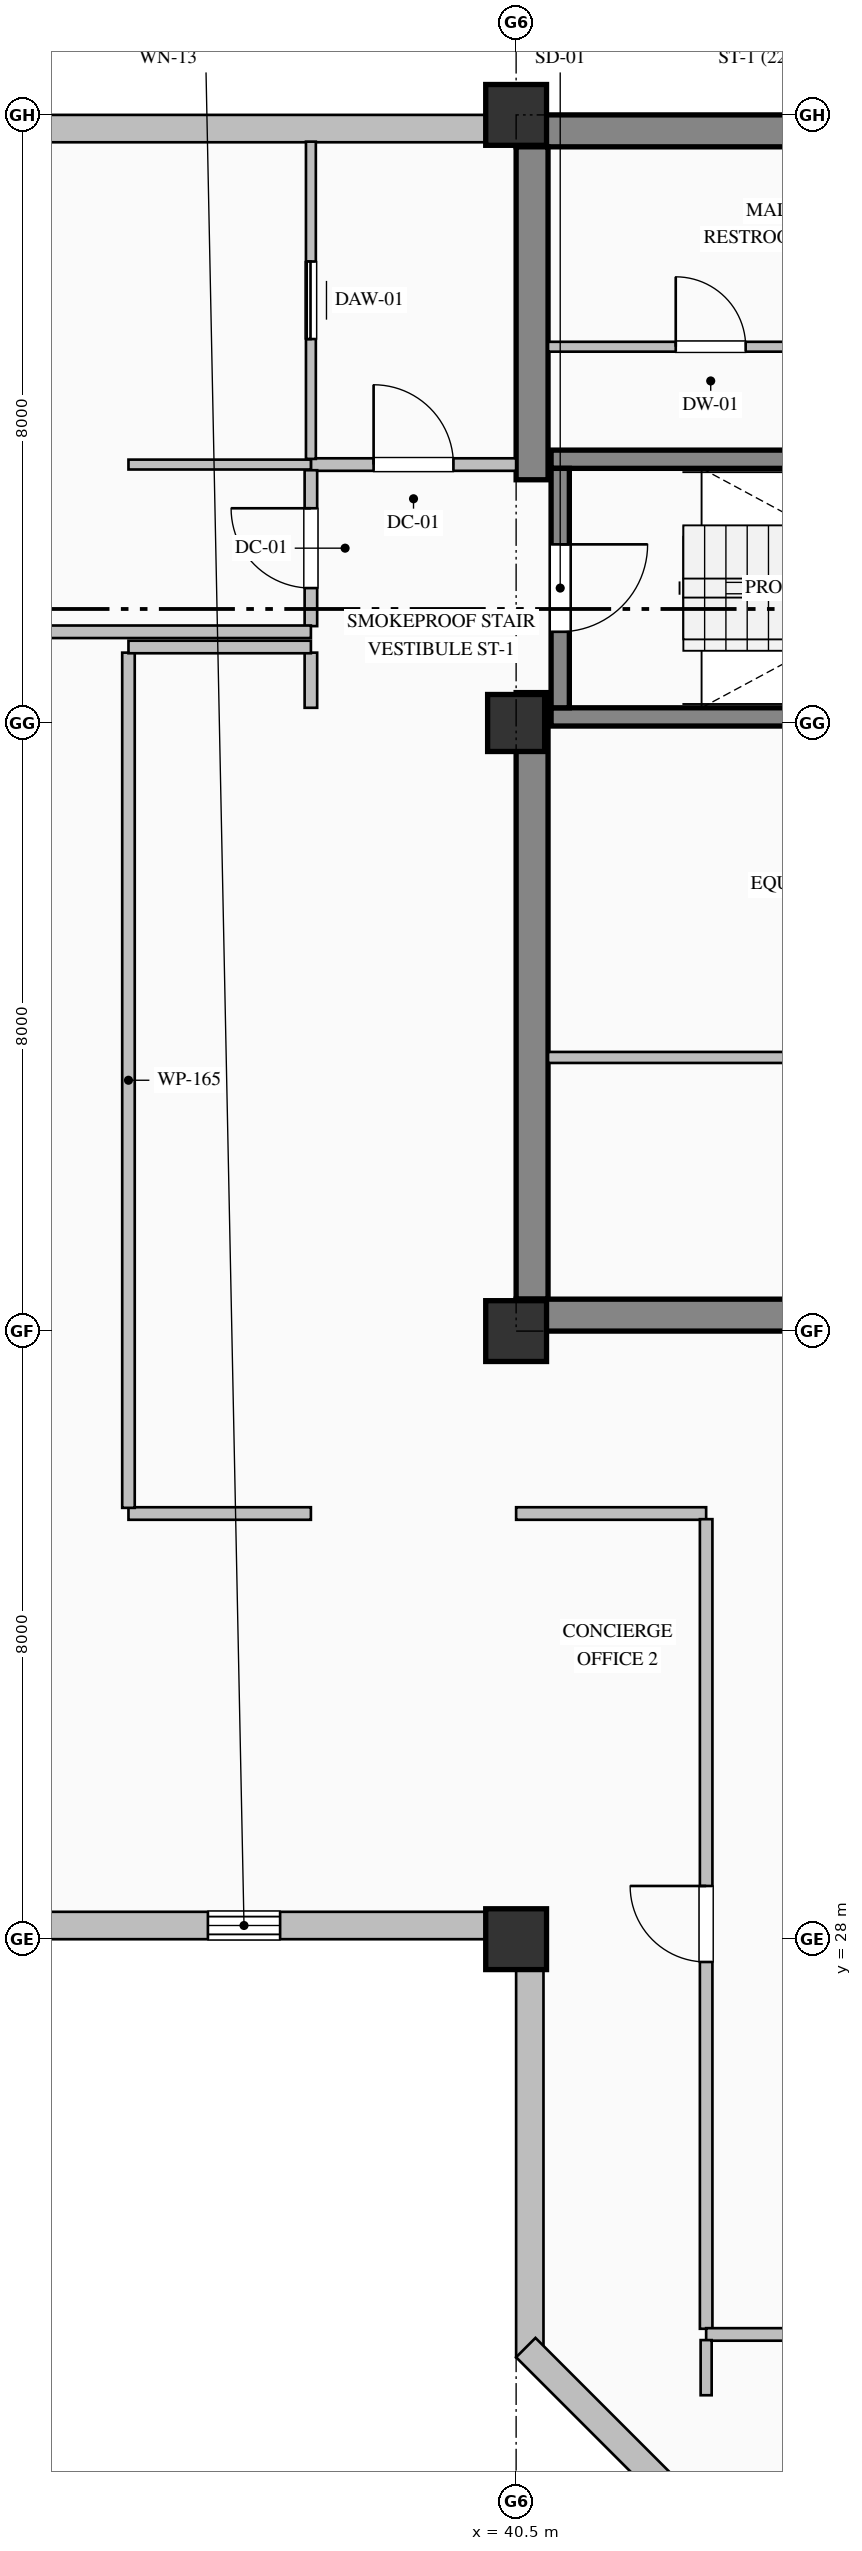
"""IFC4 building model, lengths in metres.
Left out: names, types, materials, properties, quantities, classifications, styles, units other than length and angle.
Written with IfcOpenShell. Run it as: python <this file> out.ifc"""

import sys

from ifc_helpers import new_model, si_unit, direction, frame, frame_2d, origin, origin_2d, place, context, subcontext, project, spatial, rectangle, hollow_rectangle, extrude, element, fill, save


model = new_model("IFC4")
c1 = context("Model", 3, precision=1e-05, world=origin(), true_north=direction((0.0, 1.0)))
c2 = subcontext(c1, "Body", "Model", "MODEL_VIEW")
j1 = project(units=[si_unit("LENGTHUNIT", "METRE"), si_unit("PLANEANGLEUNIT", "RADIAN")], contexts=[c1])
p1 = place(None, origin())
s1 = spatial("IfcSite", under=j1, at=p1, CompositionType="ELEMENT")
p2 = place(p1, origin())
s2 = spatial("IfcBuilding", under=s1, at=p2, CompositionType="ELEMENT")
p3 = place(p2, frame((0.0, 0.0, 331.2)))
s3 = spatial("IfcBuildingStorey", under=s2, at=p3, CompositionType="ELEMENT", Elevation=331.2)
p4 = place(p3, frame((40.5, 51.79, 0.0), z_axis=(0.0, 0.0, 1.0), x_axis=(1.0, 0.0, 0.0)))
e1 = element("IfcWall", 1, at=p4, inside=s3, PredefinedType="SHEAR", context=c2, shape_type="SweptSolid", body=[
    extrude(rectangle(XDim=23.5, YDim=0.42, at=frame_2d((11.75, 0.0))), origin(), (0.0, 0.0, 1.0), 3.785),
])
p5 = place(p3, frame((40.71, 36.42, 0.0), z_axis=(0.0, 0.0, 1.0), x_axis=(0.0, 1.0, 0.0)))
e2 = element("IfcWall", 2, at=p5, inside=s3, PredefinedType="SHEAR", context=c2, shape_type="SweptSolid", body=[
    extrude(rectangle(XDim=7.98, YDim=0.42, at=frame_2d((3.99, 0.0))), origin(), (0.0, 0.0, 1.0), 3.785),
])
p6 = place(p3, frame((40.71, 47.2, 0.0), z_axis=(0.0, 0.0, 1.0), x_axis=(0.0, 1.0, 0.0)))
e3 = element("IfcWall", 3, at=p6, inside=s3, PredefinedType="SHEAR", context=c2, shape_type="SweptSolid", body=[
    extrude(rectangle(XDim=4.38, YDim=0.42, at=frame_2d((2.19, 0.0))), origin(), (0.0, 0.0, 1.0), 3.785),
])
p7 = place(p3, frame((40.5, 36.21, 0.0), z_axis=(0.0, 0.0, 1.0), x_axis=(1.0, 0.0, 0.0)))
e4 = element("IfcWall", 4, at=p7, inside=s3, PredefinedType="SHEAR", context=c2, shape_type="SweptSolid", body=[
    extrude(rectangle(XDim=9.1, YDim=0.42, at=frame_2d((4.55, 0.0))), origin(), (0.0, 0.0, 1.0), 3.785),
])
for number, where, z_axis, x_axis in (
    (5, (40.5, 28.0, 0.0), (0.0, 0.0, 1.0), (1.0, 0.0, 0.0)),
    (6, (40.5, 36.0, 0.0), (0.0, 0.0, 1.0), (1.0, 0.0, 0.0)),
):
    element("IfcColumn", number, at=place(p3, frame(where, z_axis=z_axis, x_axis=x_axis)), inside=s3, PredefinedType="COLUMN", context=c2, shape_type="SweptSolid", body=[
        extrude(hollow_rectangle(XDim=0.8, YDim=0.8, WallThickness=0.032, at=origin_2d()), origin(), (0.0, 0.0, 1.0), 4.0),
    ])
p8 = place(p3, frame((40.5, 44.0, 0.0), z_axis=(0.0, 0.0, 1.0), x_axis=(1.0, 0.0, 0.0)))
e7 = element("IfcColumn", 7, at=p8, inside=s3, PredefinedType="COLUMN", context=c2, shape_type="SweptSolid", body=[
    extrude(rectangle(XDim=0.75, YDim=0.75, at=origin_2d()), origin(), (0.0, 0.0, 1.0), 4.0),
])
p9 = place(p3, frame((40.5, 52.0, 0.0), z_axis=(0.0, 0.0, 1.0), x_axis=(1.0, 0.0, 0.0)))
e8 = element("IfcColumn", 8, at=p9, inside=s3, PredefinedType="COLUMN", context=c2, shape_type="SweptSolid", body=[
    extrude(hollow_rectangle(XDim=0.8, YDim=0.8, WallThickness=0.032, at=origin_2d()), origin(), (0.0, 0.0, 1.0), 4.0),
])
p10 = place(p3, frame((40.68, 22.5, 0.0), z_axis=(0.0, 0.0, 1.0), x_axis=(0.0, 1.0, 0.0)))
e9 = element("IfcWall", 9, at=p10, inside=s3, PredefinedType="SOLIDWALL", context=c2, shape_type="SweptSolid", body=[
    extrude(rectangle(XDim=5.86, YDim=0.36, at=frame_2d((2.93, 0.0))), origin(), (0.0, 0.0, 1.0), 3.185),
])
p11 = place(p3, frame((40.52, 28.18, 0.0), z_axis=(0.0, 0.0, 1.0), x_axis=(-1.0, 0.0, 0.0)))
e10 = element("IfcWall", 10, at=p11, inside=s3, PredefinedType="SOLIDWALL", context=c2, shape_type="SweptSolid", body=[
    extrude(rectangle(XDim=20.02, YDim=0.36, at=frame_2d((10.01, 0.0))), origin(), (0.0, 0.0, 1.0), 3.185),
])
p12 = place(p11, frame((3.125, 0.0, 0.9)))
e11 = element("IfcOpeningElement", 11, at=p12, cuts=e10, PredefinedType="OPENING", context=c2, shape_type="SweptSolid", body=[
    extrude(rectangle(XDim=0.95, YDim=1.85, at=frame_2d((0.475, 0.925))), frame((0.0, 0.19, 0.0), z_axis=(0.0, -1.0, 0.0), x_axis=(1.0, 0.0, 0.0)), (0.0, 0.0, 1.0), 0.38),
])
p13 = place(p11, frame((10.125, 0.0, 0.9)))
e12 = element("IfcOpeningElement", 12, at=p13, cuts=e10, PredefinedType="OPENING", context=c2, shape_type="SweptSolid", body=[
    extrude(rectangle(XDim=1.35, YDim=1.85, at=frame_2d((0.675, 0.925))), frame((0.0, 0.19, 0.0), z_axis=(0.0, -1.0, 0.0), x_axis=(1.0, 0.0, 0.0)), (0.0, 0.0, 1.0), 0.38),
])
p14 = place(p11, frame((13.925, 0.0, 0.9)))
e13 = element("IfcOpeningElement", 13, at=p14, cuts=e10, PredefinedType="OPENING", context=c2, shape_type="SweptSolid", body=[
    extrude(rectangle(XDim=0.95, YDim=1.85, at=frame_2d((0.475, 0.925))), frame((0.0, 0.19, 0.0), z_axis=(0.0, -1.0, 0.0), x_axis=(1.0, 0.0, 0.0)), (0.0, 0.0, 1.0), 0.38),
])
p15 = place(p3, frame((20.5, 51.82, 0.0), z_axis=(0.0, 0.0, 1.0), x_axis=(1.0, 0.0, 0.0)))
e14 = element("IfcWall", 14, at=p15, inside=s3, PredefinedType="SOLIDWALL", context=c2, shape_type="SweptSolid", body=[
    extrude(rectangle(XDim=20.02, YDim=0.36, at=frame_2d((10.01, 0.0))), origin(), (0.0, 0.0, 1.0), 3.335),
])
p16 = place(p15, frame((6.525, 0.0, 0.9)))
e15 = element("IfcOpeningElement", 15, at=p16, cuts=e14, PredefinedType="OPENING", context=c2, shape_type="SweptSolid", body=[
    extrude(rectangle(XDim=1.35, YDim=1.85, at=frame_2d((0.675, 0.925))), frame((0.0, 0.19, 0.0), z_axis=(0.0, -1.0, 0.0), x_axis=(1.0, 0.0, 0.0)), (0.0, 0.0, 1.0), 0.38),
])
p17 = place(p15, frame((10.325, 0.0, 0.9)))
e16 = element("IfcOpeningElement", 16, at=p17, cuts=e14, PredefinedType="OPENING", context=c2, shape_type="SweptSolid", body=[
    extrude(rectangle(XDim=0.95, YDim=1.85, at=frame_2d((0.475, 0.925))), frame((0.0, 0.19, 0.0), z_axis=(0.0, -1.0, 0.0), x_axis=(1.0, 0.0, 0.0)), (0.0, 0.0, 1.0), 0.38),
])
p18 = place(p3, frame((44.627, 18.627, 0.0), z_axis=(0.0, 0.0, 1.0), x_axis=(-0.707106781187, 0.707106781187, 0.0)))
e17 = element("IfcWall", 17, at=p18, inside=s3, PredefinedType="SOLIDWALL", context=c2, shape_type="SweptSolid", body=[
    extrude(rectangle(XDim=5.657, YDim=0.36, at=frame_2d((2.828, 0.0))), origin(), (0.0, 0.0, 1.0), 3.785),
])
for number, where, z_axis, x_axis in (
    (18, (40.96, 47.47, 0.0), (0.0, 0.0, 1.0), (1.0, 0.0, 0.0)),
    (19, (49.04, 44.08, 0.0), (0.0, 0.0, 1.0), (-1.0, 0.0, 0.0)),
):
    element("IfcWall", number, at=place(p3, frame(where, z_axis=z_axis, x_axis=x_axis)), inside=s3, PredefinedType="SOLIDWALL", context=c2, shape_type="SweptSolid", body=[
        extrude(rectangle(XDim=8.08, YDim=0.24, at=frame_2d((4.04, 0.0))), origin(), (0.0, 0.0, 1.0), 4.0),
    ])
p19 = place(p3, frame((41.08, 47.35, 0.0), z_axis=(0.0, 0.0, 1.0), x_axis=(0.0, -1.0, 0.0)))
e20 = element("IfcWall", 20, at=p19, inside=s3, PredefinedType="SOLIDWALL", context=c2, shape_type="SweptSolid", body=[
    extrude(rectangle(XDim=3.15, YDim=0.24, at=frame_2d((1.575, 0.0))), origin(), (0.0, 0.0, 1.0), 4.0),
])
p20 = place(p19, frame((1.0, 0.0, 0.0)))
e21 = element("IfcOpeningElement", 21, at=p20, cuts=e20, PredefinedType="OPENING", context=c2, shape_type="SweptSolid", body=[
    extrude(rectangle(XDim=1.15, YDim=2.2, at=frame_2d((0.575, 1.1))), frame((0.0, 0.13, 0.0), z_axis=(0.0, -1.0, 0.0), x_axis=(1.0, 0.0, 0.0)), (0.0, 0.0, 1.0), 0.26),
])
p21 = place(p3, frame((37.8, 47.4, 0.0), z_axis=(0.0, 0.0, 1.0), x_axis=(1.0, 0.0, 0.0)))
e22 = element("IfcWall", 22, at=p21, inside=s3, PredefinedType="PARTITIONING", context=c2, shape_type="SweptSolid", body=[
    extrude(rectangle(XDim=2.7, YDim=0.165, at=frame_2d((1.35, 0.0))), origin(), (0.0, 0.0, 1.0), 3.785),
])
p22 = place(p21, frame((0.825, 0.0, 0.0)))
e23 = element("IfcOpeningElement", 23, at=p22, cuts=e22, PredefinedType="OPENING", context=c2, shape_type="SweptSolid", body=[
    extrude(rectangle(XDim=1.05, YDim=2.15, at=frame_2d((0.525, 1.075))), frame((0.0, 0.093, 0.0), z_axis=(0.0, -1.0, 0.0), x_axis=(1.0, 0.0, 0.0)), (0.0, 0.0, 1.0), 0.185),
])
p23 = place(p3, frame((37.8, 45.274, 0.0), z_axis=(0.0, 0.0, 1.0), x_axis=(0.0, 1.0, 0.0)))
e24 = element("IfcWall", 24, at=p23, inside=s3, PredefinedType="PARTITIONING", context=c2, shape_type="SweptSolid", body=[
    extrude(rectangle(XDim=2.051, YDim=0.165, at=frame_2d((1.025, 0.0))), origin(), (0.0, 0.0, 1.0), 3.785),
])
p24 = place(p23, frame((0.5, 0.0, 0.0)))
e25 = element("IfcOpeningElement", 25, at=p24, cuts=e24, PredefinedType="OPENING", context=c2, shape_type="SweptSolid", body=[
    extrude(rectangle(XDim=1.05, YDim=2.15, at=frame_2d((0.525, 1.075))), frame((0.0, 0.093, 0.0), z_axis=(0.0, -1.0, 0.0), x_axis=(1.0, 0.0, 0.0)), (0.0, 0.0, 1.0), 0.185),
])
p25 = place(p3, frame((37.8, 44.2, 0.0), z_axis=(0.0, 0.0, 1.0), x_axis=(0.0, 1.0, 0.0)))
e26 = element("IfcWall", 26, at=p25, inside=s3, PredefinedType="PARTITIONING", context=c2, shape_type="SweptSolid", body=[
    extrude(rectangle(XDim=0.726, YDim=0.165, at=frame_2d((0.363, 0.0))), origin(), (0.0, 0.0, 1.0), 3.785),
])
p26 = place(p3, frame((37.8, 47.475, 0.0), z_axis=(0.0, 0.0, 1.0), x_axis=(0.0, 1.0, 0.0)))
e27 = element("IfcWall", 27, at=p26, inside=s3, PredefinedType="PARTITIONING", context=c2, shape_type="SweptSolid", body=[
    extrude(rectangle(XDim=4.173, YDim=0.13, at=frame_2d((2.087, 0.0))), origin(), (0.0, 0.0, 1.0), 3.785),
])
p27 = place(p26, frame((1.577, 0.0, 0.0)))
e28 = element("IfcOpeningElement", 28, at=p27, cuts=e27, PredefinedType="OPENING", context=c2, shape_type="SweptSolid", body=[
    extrude(rectangle(XDim=1.02, YDim=2.15, at=frame_2d((0.51, 1.075))), frame((0.0, 0.075, 0.0), z_axis=(0.0, -1.0, 0.0), x_axis=(1.0, 0.0, 0.0)), (0.0, 0.0, 1.0), 0.15),
])
p28 = place(p3, frame((37.8, 47.4, 0.0), z_axis=(0.0, 0.0, 1.0), x_axis=(-1.0, 0.0, 0.0)))
e29 = element("IfcWall", 29, at=p28, inside=s3, PredefinedType="PARTITIONING", context=c2, shape_type="SweptSolid", body=[
    extrude(rectangle(XDim=2.4, YDim=0.13, at=frame_2d((1.2, 0.0))), origin(), (0.0, 0.0, 1.0), 3.785),
])
p29 = place(p3, frame((40.92, 48.95, 0.0), z_axis=(0.0, 0.0, 1.0), x_axis=(1.0, 0.0, 0.0)))
e30 = element("IfcWall", 30, at=p29, inside=s3, PredefinedType="PARTITIONING", context=c2, shape_type="SweptSolid", body=[
    extrude(rectangle(XDim=4.28, YDim=0.13, at=frame_2d((2.14, 0.0))), origin(), (0.0, 0.0, 1.0), 3.785),
])
p30 = place(p29, frame((1.68, 0.0, 0.0)))
e31 = element("IfcOpeningElement", 31, at=p30, cuts=e30, PredefinedType="OPENING", context=c2, shape_type="SweptSolid", body=[
    extrude(rectangle(XDim=0.92, YDim=2.15, at=frame_2d((0.46, 1.075))), frame((0.0, 0.075, 0.0), z_axis=(0.0, -1.0, 0.0), x_axis=(1.0, 0.0, 0.0)), (0.0, 0.0, 1.0), 0.15),
])
p31 = place(p3, frame((40.92, 39.6, 0.0), z_axis=(0.0, 0.0, 1.0), x_axis=(1.0, 0.0, 0.0)))
e32 = element("IfcWall", 32, at=p31, inside=s3, PredefinedType="PARTITIONING", context=c2, shape_type="SweptSolid", body=[
    extrude(rectangle(XDim=8.48, YDim=0.145, at=frame_2d((4.24, 0.0))), origin(), (0.0, 0.0, 1.0), 3.785),
])
p32 = place(p3, frame((37.8, 45.2, 0.0), z_axis=(0.0, 0.0, 1.0), x_axis=(-1.0, 0.0, 0.0)))
e33 = element("IfcWall", 33, at=p32, inside=s3, PredefinedType="PARTITIONING", context=c2, shape_type="SweptSolid", body=[
    extrude(rectangle(XDim=13.3, YDim=0.165, at=frame_2d((6.65, 0.0))), origin(), (0.0, 0.0, 1.0), 3.785),
])
p33 = place(p32, frame((6.15, 0.0, 0.0)))
e34 = element("IfcOpeningElement", 34, at=p33, cuts=e33, PredefinedType="OPENING", context=c2, shape_type="SweptSolid", body=[
    extrude(rectangle(XDim=1.0, YDim=2.15, at=frame_2d((0.5, 1.075))), frame((0.0, 0.093, 0.0), z_axis=(0.0, -1.0, 0.0), x_axis=(1.0, 0.0, 0.0)), (0.0, 0.0, 1.0), 0.185),
])
p34 = place(p3, frame((37.8, 33.6, 0.0), z_axis=(0.0, 0.0, 1.0), x_axis=(-1.0, 0.0, 0.0)))
e35 = element("IfcWall", 35, at=p34, inside=s3, PredefinedType="PARTITIONING", context=c2, shape_type="SweptSolid", body=[
    extrude(rectangle(XDim=2.4, YDim=0.165, at=frame_2d((1.2, 0.0))), origin(), (0.0, 0.0, 1.0), 3.785),
])
p35 = place(p3, frame((35.4, 33.675, 0.0), z_axis=(0.0, 0.0, 1.0), x_axis=(0.0, 1.0, 0.0)))
e36 = element("IfcWall", 36, at=p35, inside=s3, PredefinedType="PARTITIONING", context=c2, shape_type="SweptSolid", body=[
    extrude(rectangle(XDim=11.251, YDim=0.165, at=frame_2d((5.625, 0.0))), origin(), (0.0, 0.0, 1.0), 3.785),
])
p36 = place(p3, frame((35.4, 45.0, 0.0), z_axis=(0.0, 0.0, 1.0), x_axis=(1.0, 0.0, 0.0)))
e37 = element("IfcWall", 37, at=p36, inside=s3, PredefinedType="PARTITIONING", context=c2, shape_type="SweptSolid", body=[
    extrude(rectangle(XDim=2.4, YDim=0.165, at=frame_2d((1.2, 0.0))), origin(), (0.0, 0.0, 1.0), 3.785),
])
p37 = place(p3, frame((43.0, 33.6, 0.0), z_axis=(0.0, 0.0, 1.0), x_axis=(-1.0, 0.0, 0.0)))
e38 = element("IfcWall", 38, at=p37, inside=s3, PredefinedType="PARTITIONING", context=c2, shape_type="SweptSolid", body=[
    extrude(rectangle(XDim=2.5, YDim=0.165, at=frame_2d((1.25, 0.0))), origin(), (0.0, 0.0, 1.0), 3.785),
])
p38 = place(p3, frame((43.0, 22.875, 0.0), z_axis=(0.0, 0.0, 1.0), x_axis=(0.0, 1.0, 0.0)))
e39 = element("IfcWall", 39, at=p38, inside=s3, PredefinedType="PARTITIONING", context=c2, shape_type="SweptSolid", body=[
    extrude(rectangle(XDim=10.651, YDim=0.165, at=frame_2d((5.325, 0.0))), origin(), (0.0, 0.0, 1.0), 3.785),
])
p39 = place(p38, frame((4.825, 0.0, 0.0)))
e40 = element("IfcOpeningElement", 40, at=p39, cuts=e39, PredefinedType="OPENING", context=c2, shape_type="SweptSolid", body=[
    extrude(rectangle(XDim=1.0, YDim=2.15, at=frame_2d((0.5, 1.075))), frame((0.0, 0.093, 0.0), z_axis=(0.0, -1.0, 0.0), x_axis=(1.0, 0.0, 0.0)), (0.0, 0.0, 1.0), 0.185),
])
p40 = place(p3, frame((45.2, 22.8, 0.0), z_axis=(0.0, 0.0, 1.0), x_axis=(-1.0, 0.0, 0.0)))
e41 = element("IfcWall", 41, at=p40, inside=s3, PredefinedType="PARTITIONING", context=c2, shape_type="SweptSolid", body=[
    extrude(rectangle(XDim=2.2, YDim=0.165, at=frame_2d((1.1, 0.0))), origin(), (0.0, 0.0, 1.0), 3.785),
])
p41 = place(p3, frame((43.0, 22.726, 0.0), z_axis=(0.0, 0.0, 1.0), x_axis=(0.0, -1.0, 0.0)))
e42 = element("IfcWall", 42, at=p41, inside=s3, PredefinedType="PARTITIONING", context=c2, shape_type="SweptSolid", body=[
    extrude(rectangle(XDim=0.726, YDim=0.145, at=frame_2d((0.363, 0.0))), origin(), (0.0, 0.0, 1.0), 3.785),
])
p42 = place(p12, origin())
e43 = element("IfcWindow", 43, at=p42, inside=s3, PartitioningType="SINGLE_PANEL", PredefinedType="WINDOW", context=c2, shape_type="SweptSolid", body=[
    extrude(rectangle(XDim=0.95, YDim=1.85, at=frame_2d((0.475, 0.925))), frame((0.0, 0.15, 0.0), z_axis=(0.0, -1.0, 0.0), x_axis=(1.0, 0.0, 0.0)), (0.0, 0.0, 1.0), 0.06),
])
fill(e11, e43)
p43 = place(p20, origin())
e44 = element("IfcDoor", 44, at=p43, inside=s3, OperationType="SINGLE_SWING_LEFT", PredefinedType="DOOR", context=c2, shape_type="SweptSolid", body=[
    extrude(rectangle(XDim=1.15, YDim=2.2, at=frame_2d((0.575, 1.1))), frame((0.0, 0.025, 0.0), z_axis=(0.0, -1.0, 0.0), x_axis=(1.0, 0.0, 0.0)), (0.0, 0.0, 1.0), 0.05),
])
fill(e21, e44)
p44 = place(p22, origin())
e45 = element("IfcDoor", 45, at=p44, inside=s3, OperationType="SINGLE_SWING_LEFT", PredefinedType="DOOR", context=c2, shape_type="SweptSolid", body=[
    extrude(rectangle(XDim=1.05, YDim=2.15, at=frame_2d((0.525, 1.075))), frame((0.0, 0.025, 0.0), z_axis=(0.0, -1.0, 0.0), x_axis=(1.0, 0.0, 0.0)), (0.0, 0.0, 1.0), 0.05),
])
fill(e23, e45)
p45 = place(p24, origin())
e46 = element("IfcDoor", 46, at=p45, inside=s3, OperationType="SINGLE_SWING_RIGHT", PredefinedType="DOOR", context=c2, shape_type="SweptSolid", body=[
    extrude(rectangle(XDim=1.05, YDim=2.15, at=frame_2d((0.525, 1.075))), frame((0.0, 0.025, 0.0), z_axis=(0.0, -1.0, 0.0), x_axis=(1.0, 0.0, 0.0)), (0.0, 0.0, 1.0), 0.05),
])
fill(e25, e46)
p46 = place(p27, origin())
e47 = element("IfcDoor", 47, at=p46, inside=s3, OperationType="SLIDING_TO_LEFT", PredefinedType="DOOR", context=c2, shape_type="SweptSolid", body=[
    extrude(rectangle(XDim=1.02, YDim=2.15, at=frame_2d((0.51, 1.075))), frame((0.0, 0.025, 0.0), z_axis=(0.0, -1.0, 0.0), x_axis=(1.0, 0.0, 0.0)), (0.0, 0.0, 1.0), 0.05),
])
fill(e28, e47)
p47 = place(p30, origin())
e48 = element("IfcDoor", 48, at=p47, inside=s3, OperationType="SINGLE_SWING_LEFT", PredefinedType="DOOR", context=c2, shape_type="SweptSolid", body=[
    extrude(rectangle(XDim=0.92, YDim=2.15, at=frame_2d((0.46, 1.075))), frame((0.0, 0.025, 0.0), z_axis=(0.0, -1.0, 0.0), x_axis=(1.0, 0.0, 0.0)), (0.0, 0.0, 1.0), 0.05),
])
fill(e31, e48)
p48 = place(p39, origin())
e49 = element("IfcDoor", 49, at=p48, inside=s3, OperationType="SINGLE_SWING_RIGHT", PredefinedType="DOOR", context=c2, shape_type="SweptSolid", body=[
    extrude(rectangle(XDim=1.0, YDim=2.15, at=frame_2d((0.5, 1.075))), frame((0.0, 0.025, 0.0), z_axis=(0.0, -1.0, 0.0), x_axis=(1.0, 0.0, 0.0)), (0.0, 0.0, 1.0), 0.05),
])
fill(e40, e49)
save(model, sys.argv[1])
